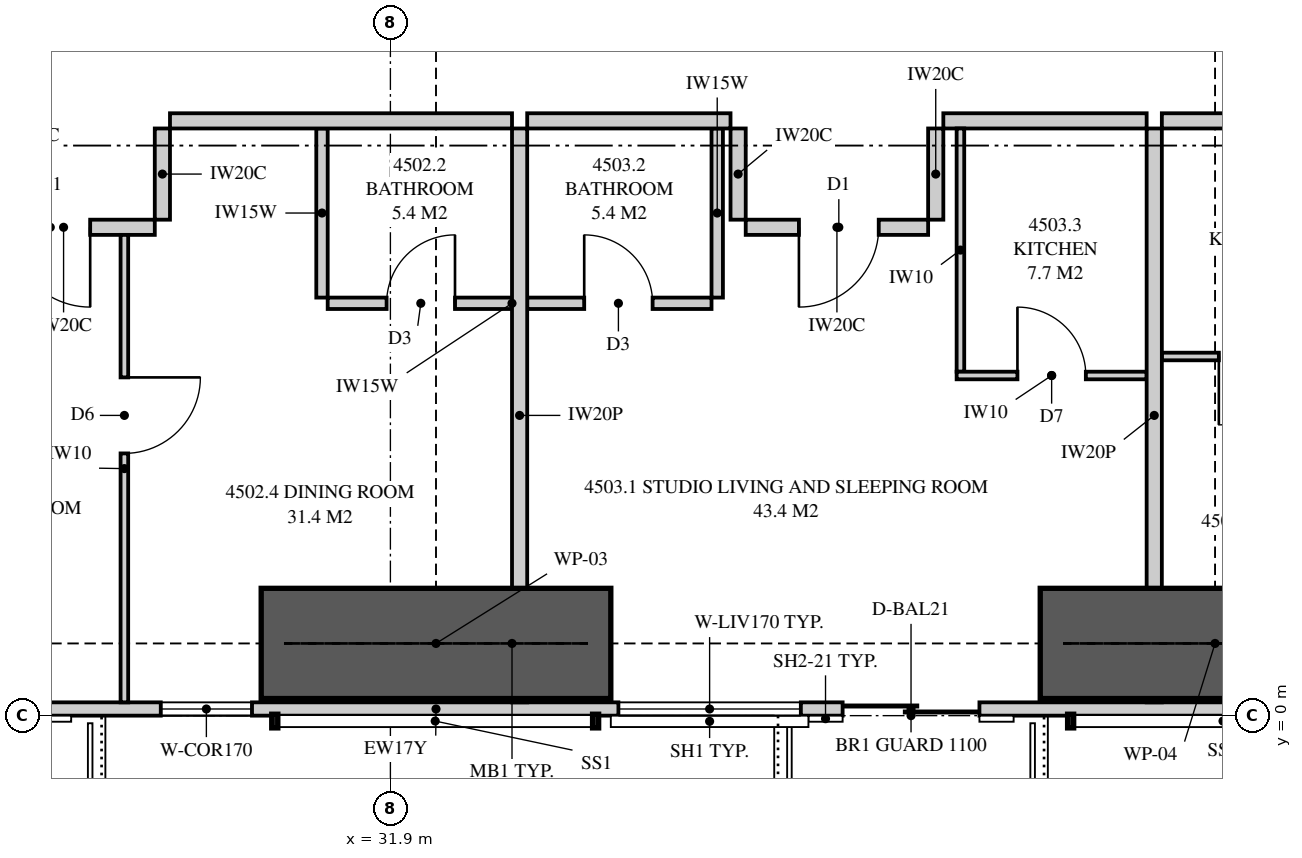
"""IFC4 building model, lengths in metres.
Left out: names, types, materials, properties, quantities, classifications, styles, units other than length and angle.
Written with IfcOpenShell. Run it as: python <this file> out.ifc"""

import sys

from ifc_helpers import new_model, si_unit, direction, frame, frame_2d, origin, place, context, subcontext, project, spatial, polyline, rectangle, outline, extrude, element, fill, save


model = new_model("IFC4")
c1 = context("Model", 3, precision=1e-05, world=origin(), true_north=direction((0.0, 1.0)))
c2 = subcontext(c1, "Body", "Model", "MODEL_VIEW")
j1 = project(units=[si_unit("LENGTHUNIT", "METRE"), si_unit("PLANEANGLEUNIT", "RADIAN")], contexts=[c1])
p1 = place(None, origin())
s1 = spatial("IfcSite", under=j1, at=p1, CompositionType="ELEMENT")
p2 = place(p1, origin())
s2 = spatial("IfcBuilding", under=s1, at=p2, CompositionType="ELEMENT")
p3 = place(p2, frame((0.0, 0.0, 167.75)))
s3 = spatial("IfcBuildingStorey", under=s2, at=p3, CompositionType="ELEMENT", Elevation=167.75)
p4 = place(p3, frame((15.051, 0.087, 0.0), z_axis=(0.0, 0.0, 1.0), x_axis=(1.0, 0.0, 0.0)))
e1 = element("IfcWall", 1, at=p4, inside=s3, PredefinedType="SOLIDWALL", context=c2, shape_type="SweptSolid", body=[
    extrude(outline(polyline([(0.0, 0.0), (34.897, 0.0), (34.897, 3.11), (27.91, 3.11), (27.91, 2.15), (27.836, 2.15), (27.836, 3.11), (27.699, 3.11), (27.699, 2.15), (7.199, 2.15), (7.199, 3.11), (7.062, 3.11), (7.062, 2.15), (6.987, 2.15), (6.987, 3.11), (0.0, 3.11), (0.0, 0.0)])), frame((0.0, 0.087, 0.0), z_axis=(0.0, -1.0, 0.0), x_axis=(1.0, 0.0, 0.0)), (0.0, 0.0, 1.0), 0.175),
])
p5 = place(p4, frame((1.824, 0.0, 0.4)))
e2 = element("IfcOpeningElement", 2, at=p5, cuts=e1, PredefinedType="OPENING", context=c2, shape_type="SweptSolid", body=[
    extrude(rectangle(XDim=2.4, YDim=1.7, at=frame_2d((1.2, 0.85))), frame((0.0, 0.097, 0.0), z_axis=(0.0, -1.0, 0.0), x_axis=(1.0, 0.0, 0.0)), (0.0, 0.0, 1.0), 0.195),
])
p6 = place(p4, frame((10.399, 0.0, 0.0)))
e3 = element("IfcOpeningElement", 3, at=p6, cuts=e1, PredefinedType="OPENING", context=c2, shape_type="SweptSolid", body=[
    extrude(rectangle(XDim=1.8, YDim=2.1, at=frame_2d((0.9, 1.05))), frame((0.0, 0.097, 0.0), z_axis=(0.0, -1.0, 0.0), x_axis=(1.0, 0.0, 0.0)), (0.0, 0.0, 1.0), 0.195),
])
p7 = place(p4, frame((13.827, 0.0, 0.4)))
e4 = element("IfcOpeningElement", 4, at=p7, cuts=e1, PredefinedType="OPENING", context=c2, shape_type="SweptSolid", body=[
    extrude(rectangle(XDim=1.2, YDim=1.7, at=frame_2d((0.6, 0.85))), frame((0.0, 0.097, 0.0), z_axis=(0.0, -1.0, 0.0), x_axis=(1.0, 0.0, 0.0)), (0.0, 0.0, 1.0), 0.195),
])
p8 = place(p4, frame((22.799, 0.0, 0.0)))
e5 = element("IfcOpeningElement", 5, at=p8, cuts=e1, PredefinedType="OPENING", context=c2, shape_type="SweptSolid", body=[
    extrude(rectangle(XDim=1.8, YDim=2.1, at=frame_2d((0.9, 1.05))), frame((0.0, 0.097, 0.0), z_axis=(0.0, -1.0, 0.0), x_axis=(1.0, 0.0, 0.0)), (0.0, 0.0, 1.0), 0.195),
])
p9 = place(p4, frame((19.849, 0.0, 0.4)))
e6 = element("IfcOpeningElement", 6, at=p9, cuts=e1, PredefinedType="OPENING", context=c2, shape_type="SweptSolid", body=[
    extrude(rectangle(XDim=2.4, YDim=1.7, at=frame_2d((1.2, 0.85))), frame((0.0, 0.097, 0.0), z_axis=(0.0, -1.0, 0.0), x_axis=(1.0, 0.0, 0.0)), (0.0, 0.0, 1.0), 0.195),
])
p10 = place(p4, frame((30.108, 0.0, 0.4)))
e7 = element("IfcOpeningElement", 7, at=p10, cuts=e1, PredefinedType="OPENING", context=c2, shape_type="SweptSolid", body=[
    extrude(rectangle(XDim=2.4, YDim=1.7, at=frame_2d((1.2, 0.85))), frame((0.0, 0.097, 0.0), z_axis=(0.0, -1.0, 0.0), x_axis=(1.0, 0.0, 0.0)), (0.0, 0.0, 1.0), 0.195),
])
p11 = place(p3, frame((33.6, 0.175, 0.0), z_axis=(0.0, 0.0, 1.0), x_axis=(0.0, 1.0, 0.0)))
e8 = element("IfcWall", 8, at=p11, inside=s3, PredefinedType="PARTITIONING", context=c2, shape_type="SweptSolid", body=[
    extrude(outline(polyline([(0.529, 2.15), (0.0, 2.15), (0.0, 0.0), (0.529, 0.0), (0.529, 0.625), (1.021, 0.625), (1.021, 0.0), (7.55, 0.0), (7.55, 3.11), (1.685, 3.11), (1.685, 2.15), (1.021, 2.15), (1.021, 1.525), (0.529, 1.525), (0.529, 2.15)])), frame((0.0, 0.1, 0.0), z_axis=(0.0, -1.0, 0.0), x_axis=(1.0, 0.0, 0.0)), (0.0, 0.0, 1.0), 0.2),
])
p12 = place(p3, frame((31.075, 5.425, 0.0), z_axis=(0.0, 0.0, 1.0), x_axis=(1.0, 0.0, 0.0)))
e9 = element("IfcWall", 9, at=p12, inside=s3, PredefinedType="PLUMBINGWALL", context=c2, shape_type="SweptSolid", body=[
    extrude(outline(polyline([(0.0, 0.0), (2.425, 0.0), (2.425, 3.11), (1.737, 3.11), (1.737, 2.541), (1.113, 2.541), (1.113, 3.11), (0.0, 3.11), (0.0, 0.0)])), frame((0.0, 0.075, 0.0), z_axis=(0.0, -1.0, 0.0), x_axis=(1.0, 0.0, 0.0)), (0.0, 0.0, 1.0), 0.15),
])
p13 = place(p12, frame((0.775, 0.0, 0.0)))
e10 = element("IfcOpeningElement", 10, at=p13, cuts=e9, PredefinedType="OPENING", context=c2, shape_type="SweptSolid", body=[
    extrude(rectangle(XDim=0.9, YDim=2.1, at=frame_2d((0.45, 1.05))), frame((0.0, 0.085, 0.0), z_axis=(0.0, -1.0, 0.0), x_axis=(1.0, 0.0, 0.0)), (0.0, 0.0, 1.0), 0.17),
])
p14 = place(p3, frame((31.0, 5.5, 0.0), z_axis=(0.0, 0.0, 1.0), x_axis=(0.0, 1.0, 0.0)))
e11 = element("IfcWall", 11, at=p14, inside=s3, PredefinedType="PLUMBINGWALL", context=c2, shape_type="SweptSolid", body=[
    extrude(rectangle(XDim=2.225, YDim=0.15, at=frame_2d((1.113, 0.0))), origin(), (0.0, 0.0, 1.0), 3.11),
])
p15 = place(p3, frame((28.4, 0.175, 0.0), z_axis=(0.0, 0.0, 1.0), x_axis=(0.0, 1.0, 0.0)))
e12 = element("IfcWall", 12, at=p15, inside=s3, PredefinedType="PARTITIONING", context=c2, shape_type="SweptSolid", body=[
    extrude(outline(polyline([(0.0, 0.0), (6.15, 0.0), (6.15, 3.11), (1.635, 3.11), (1.635, 2.15), (0.0, 2.15), (0.0, 3.11), (0.0, 0.0)])), frame((0.0, 0.05, 0.0), z_axis=(0.0, -1.0, 0.0), x_axis=(1.0, 0.0, 0.0)), (0.0, 0.0, 1.0), 0.1),
])
p16 = place(p15, frame((3.275, 0.0, 0.0)))
e13 = element("IfcOpeningElement", 13, at=p16, cuts=e12, PredefinedType="OPENING", context=c2, shape_type="SweptSolid", body=[
    extrude(rectangle(XDim=1.0, YDim=2.1, at=frame_2d((0.5, 1.05))), frame((0.0, 0.06, 0.0), z_axis=(0.0, -1.0, 0.0), x_axis=(1.0, 0.0, 0.0)), (0.0, 0.0, 1.0), 0.12),
])
p17 = place(p3, frame((41.95, 0.175, 0.0), z_axis=(0.0, 0.0, 1.0), x_axis=(0.0, 1.0, 0.0)))
e14 = element("IfcWall", 14, at=p17, inside=s3, PredefinedType="PARTITIONING", context=c2, shape_type="SweptSolid", body=[
    extrude(outline(polyline([(0.529, 2.15), (0.0, 2.15), (0.0, 0.0), (0.529, 0.0), (0.529, 0.876), (1.021, 0.876), (1.021, 0.0), (7.55, 0.0), (7.55, 3.11), (1.685, 3.11), (1.685, 2.15), (1.021, 2.15), (1.021, 1.274), (0.529, 1.274), (0.529, 2.15)])), frame((0.0, 0.1, 0.0), z_axis=(0.0, -1.0, 0.0), x_axis=(1.0, 0.0, 0.0)), (0.0, 0.0, 1.0), 0.2),
])
p18 = place(p3, frame((33.7, 7.825, 0.0), z_axis=(0.0, 0.0, 1.0), x_axis=(1.0, 0.0, 0.0)))
e15 = element("IfcWall", 15, at=p18, inside=s3, PredefinedType="PARTITIONING", context=c2, shape_type="SweptSolid", body=[
    extrude(rectangle(XDim=2.675, YDim=0.2, at=frame_2d((1.337, 0.0))), origin(), (0.0, 0.0, 1.0), 3.11),
])
p19 = place(p3, frame((33.7, 5.425, 0.0), z_axis=(0.0, 0.0, 1.0), x_axis=(1.0, 0.0, 0.0)))
e16 = element("IfcWall", 16, at=p19, inside=s3, PredefinedType="PLUMBINGWALL", context=c2, shape_type="SweptSolid", body=[
    extrude(rectangle(XDim=2.425, YDim=0.15, at=frame_2d((1.212, 0.0))), origin(), (0.0, 0.0, 1.0), 3.11),
])
p20 = place(p19, frame((0.75, 0.0, 0.0)))
e17 = element("IfcOpeningElement", 17, at=p20, cuts=e16, PredefinedType="OPENING", context=c2, shape_type="SweptSolid", body=[
    extrude(rectangle(XDim=0.9, YDim=2.1, at=frame_2d((0.45, 1.05))), frame((0.0, 0.085, 0.0), z_axis=(0.0, -1.0, 0.0), x_axis=(1.0, 0.0, 0.0)), (0.0, 0.0, 1.0), 0.17),
])
p21 = place(p3, frame((36.2, 5.5, 0.0), z_axis=(0.0, 0.0, 1.0), x_axis=(0.0, 1.0, 0.0)))
e18 = element("IfcWall", 18, at=p21, inside=s3, PredefinedType="PLUMBINGWALL", context=c2, shape_type="SweptSolid", body=[
    extrude(rectangle(XDim=2.225, YDim=0.15, at=frame_2d((1.113, 0.0))), origin(), (0.0, 0.0, 1.0), 3.11),
])
p22 = place(p3, frame((42.05, 7.825, 0.0), z_axis=(0.0, 0.0, 1.0), x_axis=(1.0, 0.0, 0.0)))
e19 = element("IfcWall", 19, at=p22, inside=s3, PredefinedType="PARTITIONING", context=c2, shape_type="SweptSolid", body=[
    extrude(outline(polyline([(0.0, 0.0), (3.9, 0.0), (3.9, 3.11), (1.037, 3.11), (1.037, 2.541), (0.363, 2.541), (0.363, 3.11), (0.0, 3.11), (0.0, 0.0)])), frame((0.0, 0.1, 0.0), z_axis=(0.0, -1.0, 0.0), x_axis=(1.0, 0.0, 0.0)), (0.0, 0.0, 1.0), 0.2),
])
p23 = place(p22, frame((2.7, 0.0, 0.0)))
e20 = element("IfcOpeningElement", 20, at=p23, cuts=e19, PredefinedType="OPENING", context=c2, shape_type="SweptSolid", body=[
    extrude(rectangle(XDim=1.05, YDim=2.2, at=frame_2d((0.525, 1.1))), frame((0.0, 0.11, 0.0), z_axis=(0.0, -1.0, 0.0), x_axis=(1.0, 0.0, 0.0)), (0.0, 0.0, 1.0), 0.22),
])
p24 = place(p3, frame((42.05, 4.725, 0.0), z_axis=(0.0, 0.0, 1.0), x_axis=(1.0, 0.0, 0.0)))
e21 = element("IfcWall", 21, at=p24, inside=s3, PredefinedType="PARTITIONING", context=c2, shape_type="SweptSolid", body=[
    extrude(outline(polyline([(0.0, 0.0), (2.35, 0.0), (2.35, 3.11), (0.987, 3.11), (0.987, 2.541), (0.413, 2.541), (0.413, 3.11), (0.0, 3.11), (0.0, 0.0)])), frame((0.0, 0.05, 0.0), z_axis=(0.0, -1.0, 0.0), x_axis=(1.0, 0.0, 0.0)), (0.0, 0.0, 1.0), 0.1),
])
p25 = place(p24, frame((0.75, 0.0, 0.0)))
e22 = element("IfcOpeningElement", 22, at=p25, cuts=e21, PredefinedType="OPENING", context=c2, shape_type="SweptSolid", body=[
    extrude(rectangle(XDim=0.9, YDim=2.1, at=frame_2d((0.45, 1.05))), frame((0.0, 0.06, 0.0), z_axis=(0.0, -1.0, 0.0), x_axis=(1.0, 0.0, 0.0)), (0.0, 0.0, 1.0), 0.12),
])
p26 = place(p3, frame((29.0, 7.825, 0.0), z_axis=(0.0, 0.0, 1.0), x_axis=(1.0, 0.0, 0.0)))
e23 = element("IfcWall", 23, at=p26, inside=s3, PredefinedType="PARTITIONING", context=c2, shape_type="SweptSolid", body=[
    extrude(outline(polyline([(0.0, 0.0), (4.5, 0.0), (4.5, 3.11), (3.837, 3.11), (3.837, 2.541), (3.163, 2.541), (3.163, 3.11), (0.0, 3.11), (0.0, 0.0)])), frame((0.0, 0.1, 0.0), z_axis=(0.0, -1.0, 0.0), x_axis=(1.0, 0.0, 0.0)), (0.0, 0.0, 1.0), 0.2),
])
p27 = place(p3, frame((26.4, 6.425, 0.0), z_axis=(0.0, 0.0, 1.0), x_axis=(1.0, 0.0, 0.0)))
e24 = element("IfcWall", 24, at=p27, inside=s3, PredefinedType="PARTITIONING", context=c2, shape_type="SweptSolid", body=[
    extrude(rectangle(XDim=2.4, YDim=0.2, at=frame_2d((1.2, 0.0))), origin(), (0.0, 0.0, 1.0), 3.11),
])
p28 = place(p27, frame((0.5, 0.0, 0.0)))
e25 = element("IfcOpeningElement", 25, at=p28, cuts=e24, PredefinedType="OPENING", context=c2, shape_type="SweptSolid", body=[
    extrude(rectangle(XDim=1.05, YDim=2.2, at=frame_2d((0.525, 1.1))), frame((0.0, 0.11, 0.0), z_axis=(0.0, -1.0, 0.0), x_axis=(1.0, 0.0, 0.0)), (0.0, 0.0, 1.0), 0.22),
])
p29 = place(p3, frame((28.9, 7.725, 0.0), z_axis=(0.0, 0.0, 1.0), x_axis=(0.0, -1.0, 0.0)))
e26 = element("IfcWall", 26, at=p29, inside=s3, PredefinedType="PARTITIONING", context=c2, shape_type="SweptSolid", body=[
    extrude(rectangle(XDim=1.2, YDim=0.2, at=frame_2d((0.6, 0.0))), origin(), (0.0, 0.0, 1.0), 3.11),
])
p30 = place(p3, frame((39.175, 7.825, 0.0), z_axis=(0.0, 0.0, 1.0), x_axis=(1.0, 0.0, 0.0)))
e27 = element("IfcWall", 27, at=p30, inside=s3, PredefinedType="PARTITIONING", context=c2, shape_type="SweptSolid", body=[
    extrude(rectangle(XDim=2.675, YDim=0.2, at=frame_2d((1.337, 0.0))), origin(), (0.0, 0.0, 1.0), 3.11),
])
p31 = place(p3, frame((36.575, 6.425, 0.0), z_axis=(0.0, 0.0, 1.0), x_axis=(1.0, 0.0, 0.0)))
e28 = element("IfcWall", 28, at=p31, inside=s3, PredefinedType="PARTITIONING", context=c2, shape_type="SweptSolid", body=[
    extrude(rectangle(XDim=2.4, YDim=0.2, at=frame_2d((1.2, 0.0))), origin(), (0.0, 0.0, 1.0), 3.11),
])
p32 = place(p31, frame((0.7, 0.0, 0.0)))
e29 = element("IfcOpeningElement", 29, at=p32, cuts=e28, PredefinedType="OPENING", context=c2, shape_type="SweptSolid", body=[
    extrude(rectangle(XDim=1.05, YDim=2.2, at=frame_2d((0.525, 1.1))), frame((0.0, 0.11, 0.0), z_axis=(0.0, -1.0, 0.0), x_axis=(1.0, 0.0, 0.0)), (0.0, 0.0, 1.0), 0.22),
])
for number, where, z_axis, x_axis in (
    (30, (36.475, 7.725, 0.0), (0.0, 0.0, 1.0), (0.0, -1.0, 0.0)),
    (31, (39.075, 7.725, 0.0), (0.0, 0.0, 1.0), (0.0, -1.0, 0.0)),
):
    element("IfcWall", number, at=place(p3, frame(where, z_axis=z_axis, x_axis=x_axis)), inside=s3, PredefinedType="PARTITIONING", context=c2, shape_type="SweptSolid", body=[
        extrude(rectangle(XDim=1.2, YDim=0.2, at=frame_2d((0.6, 0.0))), origin(), (0.0, 0.0, 1.0), 3.11),
    ])
p33 = place(p3, frame((41.85, 4.475, 0.0), z_axis=(0.0, 0.0, 1.0), x_axis=(-1.0, 0.0, 0.0)))
e32 = element("IfcWall", 32, at=p33, inside=s3, PredefinedType="PARTITIONING", context=c2, shape_type="SweptSolid", body=[
    extrude(rectangle(XDim=2.5, YDim=0.1, at=frame_2d((1.25, 0.0))), origin(), (0.0, 0.0, 1.0), 3.11),
])
p34 = place(p33, frame((0.8, 0.0, 0.0)))
e33 = element("IfcOpeningElement", 33, at=p34, cuts=e32, PredefinedType="OPENING", context=c2, shape_type="SweptSolid", body=[
    extrude(rectangle(XDim=0.9, YDim=2.1, at=frame_2d((0.45, 1.05))), frame((0.0, 0.06, 0.0), z_axis=(0.0, -1.0, 0.0), x_axis=(1.0, 0.0, 0.0)), (0.0, 0.0, 1.0), 0.12),
])
p35 = place(p3, frame((39.4, 7.725, 0.0), z_axis=(0.0, 0.0, 1.0), x_axis=(0.0, -1.0, 0.0)))
e34 = element("IfcWall", 34, at=p35, inside=s3, PredefinedType="PARTITIONING", context=c2, shape_type="SweptSolid", body=[
    extrude(rectangle(XDim=3.2, YDim=0.1, at=frame_2d((1.6, 0.0))), origin(), (0.0, 0.0, 1.0), 3.11),
])
for number, where, z_axis, x_axis in (
    (35, (30.2, 0.95, 0.0), (0.0, 0.0, 1.0), (1.0, 0.0, 0.0)),
    (36, (40.45, 0.95, 0.0), (0.0, 0.0, 1.0), (1.0, 0.0, 0.0)),
):
    element("IfcWall", number, at=place(p3, frame(where, z_axis=z_axis, x_axis=x_axis)), inside=s3, PredefinedType="SHEAR", context=c2, shape_type="SweptSolid", body=[
        extrude(rectangle(XDim=4.6, YDim=1.45, at=frame_2d((2.3, 0.0))), origin(), (0.0, 0.0, 1.0), 3.35),
    ])
p36 = place(p7, origin())
e37 = element("IfcWindow", 37, at=p36, inside=s3, PartitioningType="SINGLE_PANEL", PredefinedType="WINDOW", context=c2, shape_type="SweptSolid", body=[
    extrude(rectangle(XDim=1.2, YDim=1.7, at=frame_2d((0.6, 0.85))), frame((0.0, 0.03, 0.0), z_axis=(0.0, -1.0, 0.0), x_axis=(1.0, 0.0, 0.0)), (0.0, 0.0, 1.0), 0.06),
])
fill(e4, e37)
p37 = place(p8, origin())
e38 = element("IfcDoor", 38, at=p37, inside=s3, OperationType="SLIDING_TO_LEFT", PredefinedType="DOOR", context=c2, shape_type="SweptSolid", body=[
    extrude(rectangle(XDim=1.8, YDim=2.1, at=frame_2d((0.9, 1.05))), frame((0.0, 0.025, 0.0), z_axis=(0.0, -1.0, 0.0), x_axis=(1.0, 0.0, 0.0)), (0.0, 0.0, 1.0), 0.05),
])
fill(e5, e38)
p38 = place(p9, origin())
e39 = element("IfcWindow", 39, at=p38, inside=s3, PartitioningType="SINGLE_PANEL", PredefinedType="WINDOW", context=c2, shape_type="SweptSolid", body=[
    extrude(rectangle(XDim=2.4, YDim=1.7, at=frame_2d((1.2, 0.85))), frame((0.0, 0.03, 0.0), z_axis=(0.0, -1.0, 0.0), x_axis=(1.0, 0.0, 0.0)), (0.0, 0.0, 1.0), 0.06),
])
fill(e6, e39)
p39 = place(p28, frame((1.05, 0.0, 0.0), z_axis=(0.0, 0.0, 1.0), x_axis=(-1.0, 0.0, 0.0)))
e40 = element("IfcDoor", 40, at=p39, inside=s3, OperationType="SINGLE_SWING_LEFT", PredefinedType="DOOR", context=c2, shape_type="SweptSolid", body=[
    extrude(rectangle(XDim=1.05, YDim=2.2, at=frame_2d((0.525, 1.1))), frame((0.0, 0.025, 0.0), z_axis=(0.0, -1.0, 0.0), x_axis=(1.0, 0.0, 0.0)), (0.0, 0.0, 1.0), 0.05),
])
fill(e25, e40)
p40 = place(p13, origin())
e41 = element("IfcDoor", 41, at=p40, inside=s3, OperationType="SINGLE_SWING_RIGHT", PredefinedType="DOOR", context=c2, shape_type="SweptSolid", body=[
    extrude(rectangle(XDim=0.9, YDim=2.1, at=frame_2d((0.45, 1.05))), frame((0.0, 0.025, 0.0), z_axis=(0.0, -1.0, 0.0), x_axis=(1.0, 0.0, 0.0)), (0.0, 0.0, 1.0), 0.05),
])
fill(e10, e41)
p41 = place(p16, frame((1.0, 0.0, 0.0), z_axis=(0.0, 0.0, 1.0), x_axis=(-1.0, 0.0, 0.0)))
e42 = element("IfcDoor", 42, at=p41, inside=s3, OperationType="SINGLE_SWING_LEFT", PredefinedType="DOOR", context=c2, shape_type="SweptSolid", body=[
    extrude(rectangle(XDim=1.0, YDim=2.1, at=frame_2d((0.5, 1.05))), frame((0.0, 0.025, 0.0), z_axis=(0.0, -1.0, 0.0), x_axis=(1.0, 0.0, 0.0)), (0.0, 0.0, 1.0), 0.05),
])
fill(e13, e42)
p42 = place(p32, frame((1.05, 0.0, 0.0), z_axis=(0.0, 0.0, 1.0), x_axis=(-1.0, 0.0, 0.0)))
e43 = element("IfcDoor", 43, at=p42, inside=s3, OperationType="SINGLE_SWING_RIGHT", PredefinedType="DOOR", context=c2, shape_type="SweptSolid", body=[
    extrude(rectangle(XDim=1.05, YDim=2.2, at=frame_2d((0.525, 1.1))), frame((0.0, 0.025, 0.0), z_axis=(0.0, -1.0, 0.0), x_axis=(1.0, 0.0, 0.0)), (0.0, 0.0, 1.0), 0.05),
])
fill(e29, e43)
p43 = place(p20, origin())
e44 = element("IfcDoor", 44, at=p43, inside=s3, OperationType="SINGLE_SWING_LEFT", PredefinedType="DOOR", context=c2, shape_type="SweptSolid", body=[
    extrude(rectangle(XDim=0.9, YDim=2.1, at=frame_2d((0.45, 1.05))), frame((0.0, 0.025, 0.0), z_axis=(0.0, -1.0, 0.0), x_axis=(1.0, 0.0, 0.0)), (0.0, 0.0, 1.0), 0.05),
])
fill(e17, e44)
p44 = place(p25, frame((0.9, 0.0, 0.0), z_axis=(0.0, 0.0, 1.0), x_axis=(-1.0, 0.0, 0.0)))
e45 = element("IfcDoor", 45, at=p44, inside=s3, OperationType="SINGLE_SWING_RIGHT", PredefinedType="DOOR", context=c2, shape_type="SweptSolid", body=[
    extrude(rectangle(XDim=0.9, YDim=2.1, at=frame_2d((0.45, 1.05))), frame((0.0, 0.025, 0.0), z_axis=(0.0, -1.0, 0.0), x_axis=(1.0, 0.0, 0.0)), (0.0, 0.0, 1.0), 0.05),
])
fill(e22, e45)
p45 = place(p34, frame((0.9, 0.0, 0.0), z_axis=(0.0, 0.0, 1.0), x_axis=(-1.0, 0.0, 0.0)))
e46 = element("IfcDoor", 46, at=p45, inside=s3, OperationType="SINGLE_SWING_LEFT", PredefinedType="DOOR", context=c2, shape_type="SweptSolid", body=[
    extrude(rectangle(XDim=0.9, YDim=2.1, at=frame_2d((0.45, 1.05))), frame((0.0, 0.025, 0.0), z_axis=(0.0, -1.0, 0.0), x_axis=(1.0, 0.0, 0.0)), (0.0, 0.0, 1.0), 0.05),
])
fill(e33, e46)
save(model, sys.argv[1])
